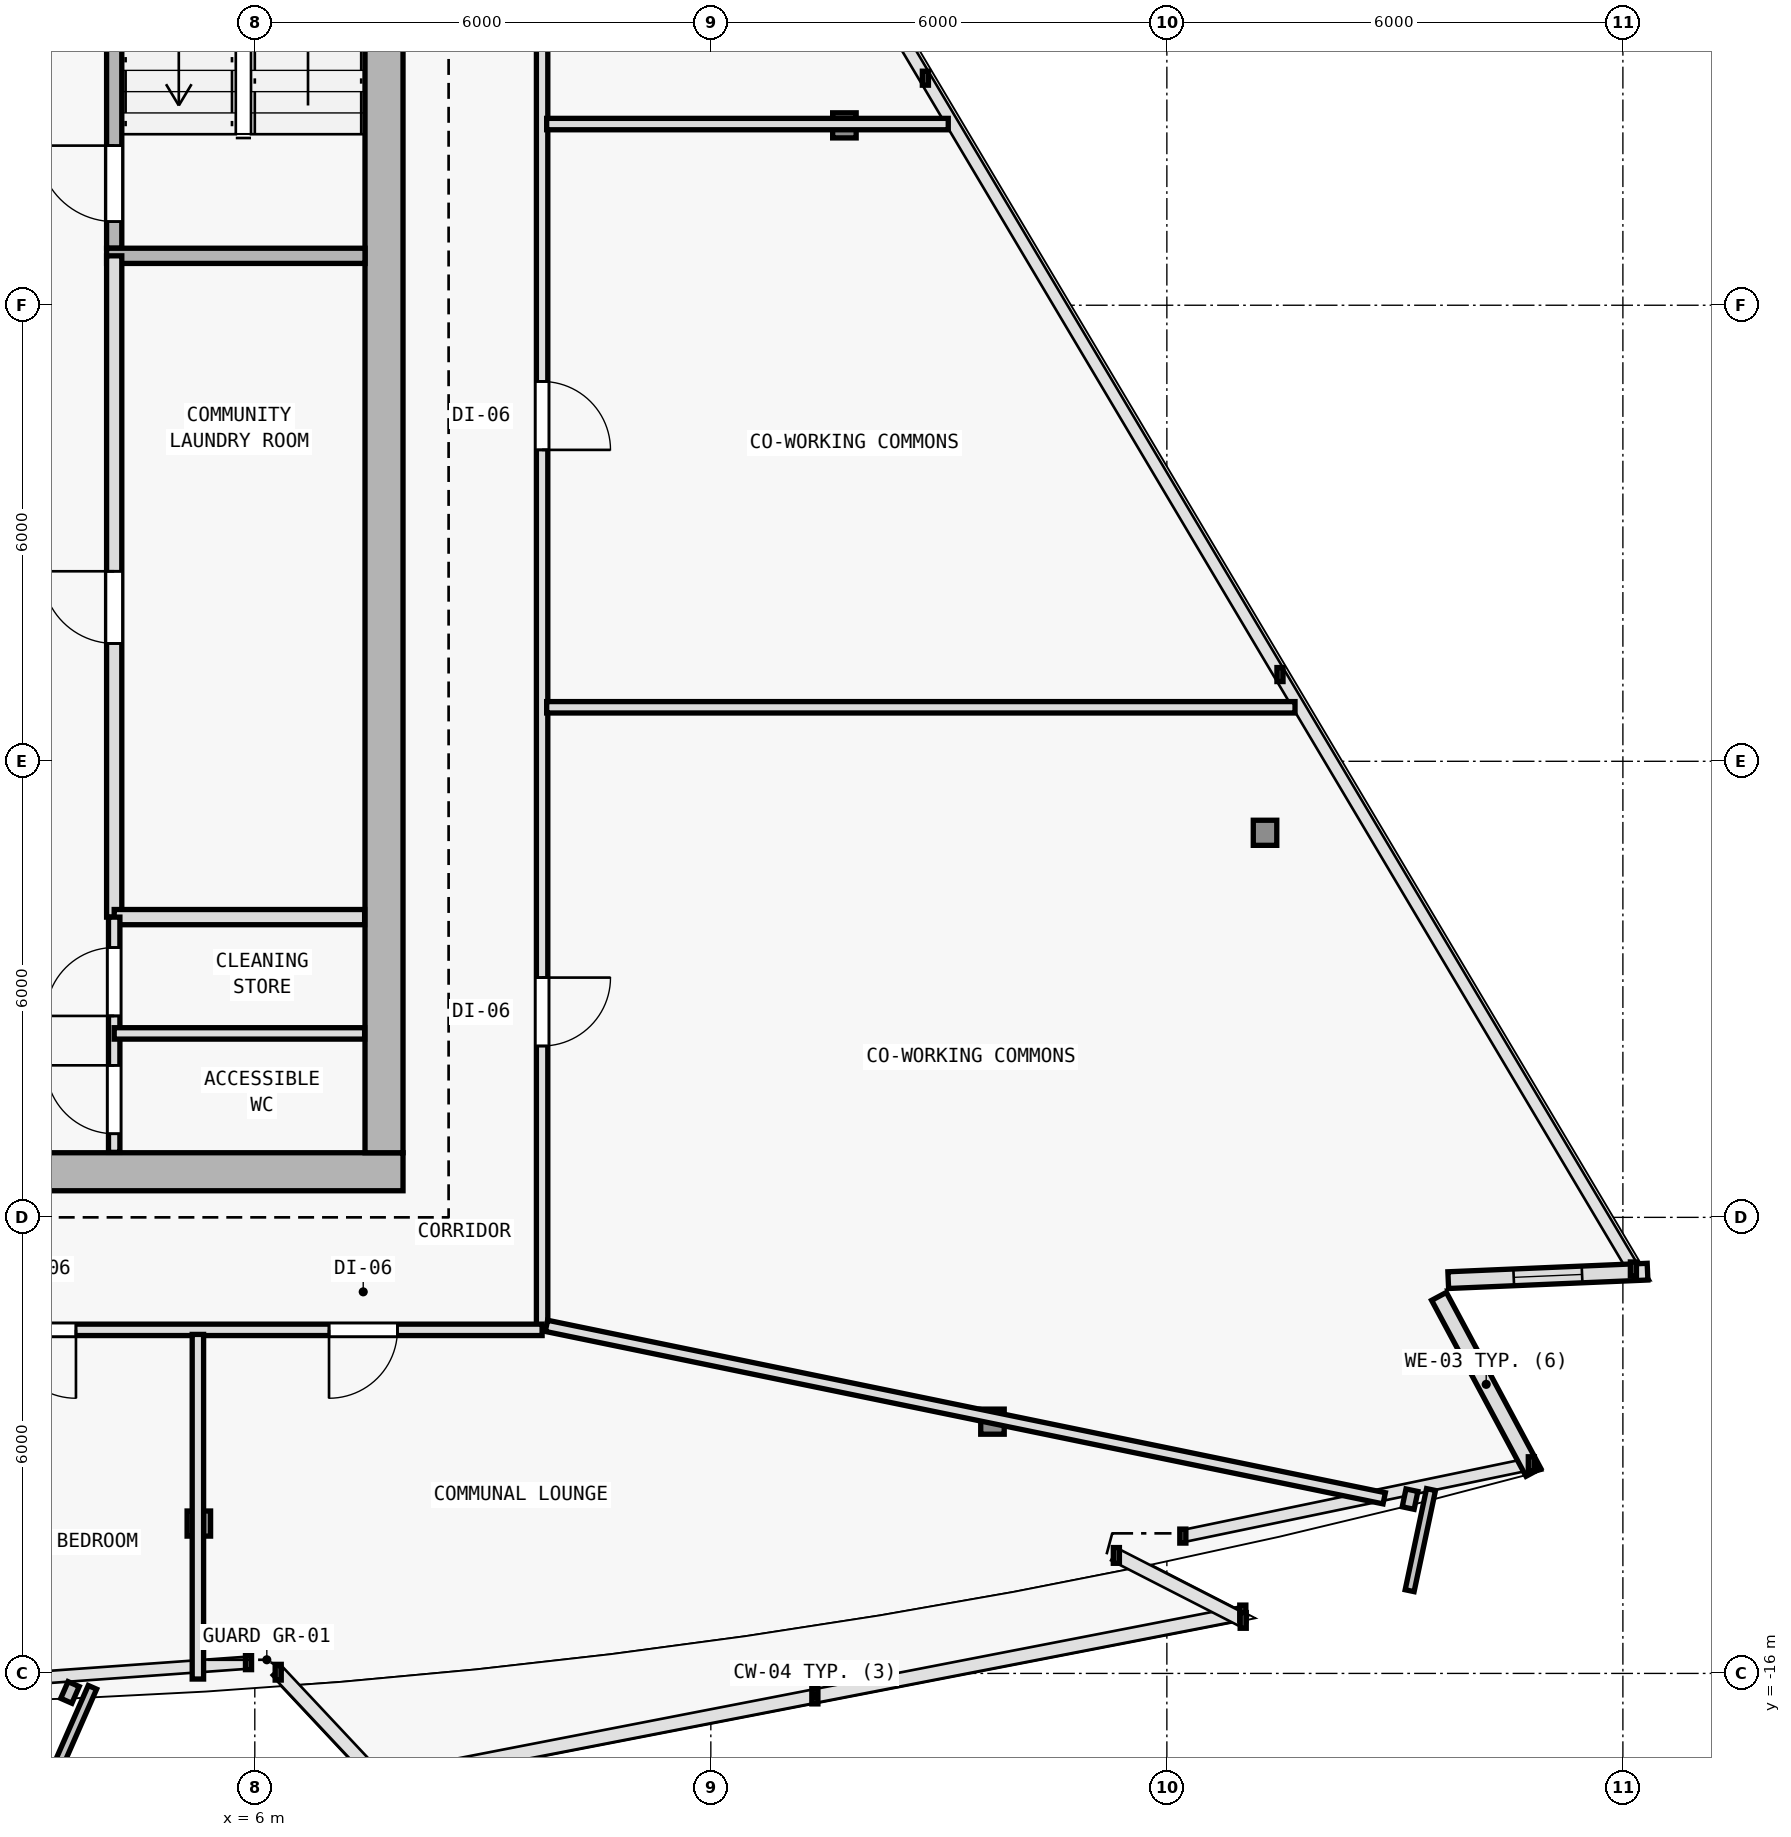
"""IFC4 building model, lengths in metres.
Left out: names, types, materials, properties, quantities, classifications, styles, units other than length and angle.
Written with IfcOpenShell. Run it as: python <this file> out.ifc"""

import sys

from ifc_helpers import new_model, si_unit, direction, frame, frame_2d, origin, origin_2d, place, context, subcontext, project, spatial, rectangle, i_section, extrude, element, fill, save


model = new_model("IFC4")
c1 = context("Model", 3, precision=1e-05, world=origin(), true_north=direction((0.0, 1.0)))
c2 = subcontext(c1, "Body", "Model", "MODEL_VIEW")
j1 = project(units=[si_unit("LENGTHUNIT", "METRE"), si_unit("PLANEANGLEUNIT", "RADIAN")], contexts=[c1])
p1 = place(None, origin())
s1 = spatial("IfcSite", under=j1, at=p1, CompositionType="ELEMENT")
p2 = place(p1, origin())
s2 = spatial("IfcBuilding", under=s1, at=p2, CompositionType="ELEMENT")
p3 = place(p2, frame((0.0, 0.0, 261.6)))
s3 = spatial("IfcBuildingStorey", under=s2, at=p3, CompositionType="ELEMENT", Elevation=261.6)
for number, where, z_axis, x_axis in (
    (1, (7.7, -9.4, 0.0), (0.0, 0.0, 1.0), (1.0, 0.0, 0.0)),
    (2, (7.7, 0.4, 0.0), (0.0, 0.0, 1.0), (1.0, 0.0, 0.0)),
):
    element("IfcColumn", number, at=place(p3, frame(where, z_axis=z_axis, x_axis=x_axis)), inside=s3, PredefinedType="COLUMN", context=c2, shape_type="SweptSolid", body=[
        extrude(i_section(OverallWidth=0.374, OverallDepth=0.372, WebThickness=0.012, FlangeThickness=0.02, FilletRadius=0.015, at=origin_2d()), origin(), (0.0, 0.0, 1.0), 3.6),
    ])
p4 = place(p3, frame((5.264, -14.028, 0.005), z_axis=(-0.006865858153, 0.03521301508, 0.99935624457), x_axis=(-0.981516643497, -0.191376797284, 0.0)))
e3 = element("IfcColumn", 3, at=p4, inside=s3, PredefinedType="COLUMN", context=c2, shape_type="SweptSolid", body=[
    extrude(i_section(OverallWidth=0.309, OverallDepth=0.33, WebThickness=0.011, FlangeThickness=0.019, FilletRadius=0.027, at=origin_2d()), origin(), (0.0, 0.0, 1.0), 3.591),
])
p5 = place(p3, frame((15.706, -12.688, 0.005), z_axis=(-0.020594893987, 0.033509183946, 0.999226193078), x_axis=(-0.851954850327, -0.523615252838, 0.0)))
e4 = element("IfcColumn", 4, at=p5, inside=s3, PredefinedType="COLUMN", context=c2, shape_type="SweptSolid", body=[
    extrude(i_section(OverallWidth=0.309, OverallDepth=0.33, WebThickness=0.011, FlangeThickness=0.019, FilletRadius=0.027, at=origin_2d()), origin(), (0.0, 0.0, 1.0), 3.592),
])
p6 = place(p3, frame((19.292, -4.941, 0.005), z_axis=(-0.026037725696, 0.021618790526, 0.9994271683), x_axis=(-0.638800249892, -0.769372628015, 0.0)))
e5 = element("IfcColumn", 5, at=p6, inside=s3, PredefinedType="COLUMN", context=c2, shape_type="SweptSolid", body=[
    extrude(i_section(OverallWidth=0.309, OverallDepth=0.33, WebThickness=0.011, FlangeThickness=0.019, FilletRadius=0.027, at=origin_2d()), origin(), (0.0, 0.0, 1.0), 3.591),
])
p7 = place(p3, frame((13.757, 4.366, 0.005), z_axis=(-0.018906041, 0.009521027842, 0.999775930718), x_axis=(-0.449781931574, -0.893138406984, 0.0)))
e6 = element("IfcColumn", 6, at=p7, inside=s3, PredefinedType="COLUMN", context=c2, shape_type="SweptSolid", body=[
    extrude(i_section(OverallWidth=0.309, OverallDepth=0.33, WebThickness=0.011, FlangeThickness=0.019, FilletRadius=0.027, at=origin_2d()), origin(), (0.0, 0.0, 1.0), 3.59),
])
p8 = place(p3, frame((21.581, -11.04, 0.0), z_axis=(0.0, 0.0, 1.0), x_axis=(0.472791303324, -0.881174434208, 0.0)))
e7 = element("IfcWall", 7, at=p8, inside=s3, PredefinedType="SOLIDWALL", context=c2, shape_type="SweptSolid", body=[
    extrude(rectangle(XDim=2.627, YDim=0.22, at=frame_2d((1.313, 0.0))), origin(), (0.0, 0.0, 1.0), 3.35),
])
p9 = place(p3, frame((24.324, -10.714, 0.0), z_axis=(0.0, 0.0, 1.0), x_axis=(-0.999095924753, -0.042512740932, 0.0)))
e8 = element("IfcWall", 8, at=p9, inside=s3, PredefinedType="SOLIDWALL", context=c2, shape_type="SweptSolid", body=[
    extrude(rectangle(XDim=2.625, YDim=0.22, at=frame_2d((1.312, 0.0))), origin(), (0.0, 0.0, 1.0), 3.35),
])
p10 = place(p9, frame((0.862, 0.0, 0.62)))
e9 = element("IfcOpeningElement", 9, at=p10, cuts=e8, PredefinedType="OPENING", context=c2, shape_type="SweptSolid", body=[
    extrude(rectangle(XDim=0.9, YDim=1.6, at=frame_2d((0.45, 0.8))), frame((0.0, 0.12, 0.0), z_axis=(0.0, -1.0, 0.0), x_axis=(1.0, 0.0, 0.0)), (0.0, 0.0, 1.0), 0.24),
])
p11 = place(p3, frame((-7.95, -9.4, 0.0), z_axis=(0.0, 0.0, 1.0), x_axis=(1.0, 0.0, 0.0)))
e10 = element("IfcWall", 10, at=p11, inside=s3, PredefinedType="SHEAR", context=c2, shape_type="SweptSolid", body=[
    extrude(rectangle(XDim=15.9, YDim=0.5, at=frame_2d((7.95, 0.0))), origin(), (0.0, 0.0, 1.0), 3.35),
])
p12 = place(p11, frame((9.6, 0.0, 0.0)))
e11 = element("IfcOpeningElement", 11, at=p12, cuts=e10, PredefinedType="OPENING", context=c2, shape_type="SweptSolid", body=[
    extrude(rectangle(XDim=1.5, YDim=2.2, at=frame_2d((0.75, 1.1))), frame((0.0, 0.26, 0.0), z_axis=(0.0, -1.0, 0.0), x_axis=(1.0, 0.0, 0.0)), (0.0, 0.0, 1.0), 0.52),
])
p13 = place(p3, frame((7.7, 9.95, 0.0), z_axis=(0.0, 0.0, 1.0), x_axis=(0.0, -1.0, 0.0)))
e12 = element("IfcWall", 12, at=p13, inside=s3, PredefinedType="SHEAR", context=c2, shape_type="SweptSolid", body=[
    extrude(rectangle(XDim=19.1, YDim=0.5, at=frame_2d((9.55, 0.0))), origin(), (0.0, 0.0, 1.0), 3.35),
])
p14 = place(p3, frame((4.15, 2.75, 0.0), z_axis=(0.0, 0.0, 1.0), x_axis=(0.0, 1.0, 0.0)))
e13 = element("IfcWall", 13, at=p14, inside=s3, PredefinedType="SOLIDWALL", context=c2, shape_type="SweptSolid", body=[
    extrude(rectangle(XDim=7.2, YDim=0.2, at=frame_2d((3.6, 0.0))), origin(), (0.0, 0.0, 1.0), 3.35),
])
p15 = place(p14, frame((0.35, 0.0, 0.0)))
e14 = element("IfcOpeningElement", 14, at=p15, cuts=e13, PredefinedType="OPENING", context=c2, shape_type="SweptSolid", body=[
    extrude(rectangle(XDim=1.0, YDim=2.15, at=frame_2d((0.5, 1.075))), frame((0.0, 0.11, 0.0), z_axis=(0.0, -1.0, 0.0), x_axis=(1.0, 0.0, 0.0)), (0.0, 0.0, 1.0), 0.22),
])
p16 = place(p3, frame((4.05, 2.65, 0.0), z_axis=(0.0, 0.0, 1.0), x_axis=(1.0, 0.0, 0.0)))
e15 = element("IfcWall", 15, at=p16, inside=s3, PredefinedType="SOLIDWALL", context=c2, shape_type="SweptSolid", body=[
    extrude(rectangle(XDim=3.4, YDim=0.2, at=frame_2d((1.7, 0.0))), origin(), (0.0, 0.0, 1.0), 3.35),
])
p17 = place(p3, frame((4.15, -6.05, 0.0), z_axis=(0.0, 0.0, 1.0), x_axis=(0.0, 1.0, 0.0)))
e16 = element("IfcWall", 16, at=p17, inside=s3, PredefinedType="SOLIDWALL", context=c2, shape_type="SweptSolid", body=[
    extrude(rectangle(XDim=8.7, YDim=0.2, at=frame_2d((4.35, 0.0))), origin(), (0.0, 0.0, 1.0), 3.35),
])
p18 = place(p17, frame((3.6, 0.0, 0.0)))
e17 = element("IfcOpeningElement", 17, at=p18, cuts=e16, PredefinedType="OPENING", context=c2, shape_type="SweptSolid", body=[
    extrude(rectangle(XDim=0.95, YDim=2.1, at=frame_2d((0.475, 1.05))), frame((0.0, 0.11, 0.0), z_axis=(0.0, -1.0, 0.0), x_axis=(1.0, 0.0, 0.0)), (0.0, 0.0, 1.0), 0.22),
])
p19 = place(p3, frame((4.15, -6.05, 0.0), z_axis=(0.0, 0.0, 1.0), x_axis=(1.0, 0.0, 0.0)))
e18 = element("IfcWall", 18, at=p19, inside=s3, PredefinedType="SOLIDWALL", context=c2, shape_type="SweptSolid", body=[
    extrude(rectangle(XDim=3.295, YDim=0.2, at=frame_2d((1.647, 0.0))), origin(), (0.0, 0.0, 1.0), 3.35),
])
p20 = place(p3, frame((4.15, -9.145, 0.0), z_axis=(0.0, 0.0, 1.0), x_axis=(0.0, 1.0, 0.0)))
e19 = element("IfcWall", 19, at=p20, inside=s3, PredefinedType="PARTITIONING", context=c2, shape_type="SweptSolid", body=[
    extrude(rectangle(XDim=3.095, YDim=0.15, at=frame_2d((1.547, 0.0))), origin(), (0.0, 0.0, 1.0), 3.35),
])
p21 = place(p20, frame((0.245, 0.0, 0.0)))
e20 = element("IfcOpeningElement", 20, at=p21, cuts=e19, PredefinedType="OPENING", context=c2, shape_type="SweptSolid", body=[
    extrude(rectangle(XDim=0.9, YDim=2.1, at=frame_2d((0.45, 1.05))), frame((0.0, 0.085, 0.0), z_axis=(0.0, -1.0, 0.0), x_axis=(1.0, 0.0, 0.0)), (0.0, 0.0, 1.0), 0.17),
])
p22 = place(p20, frame((1.795, 0.0, 0.0)))
e21 = element("IfcOpeningElement", 21, at=p22, cuts=e19, PredefinedType="OPENING", context=c2, shape_type="SweptSolid", body=[
    extrude(rectangle(XDim=0.9, YDim=2.1, at=frame_2d((0.45, 1.05))), frame((0.0, 0.085, 0.0), z_axis=(0.0, -1.0, 0.0), x_axis=(1.0, 0.0, 0.0)), (0.0, 0.0, 1.0), 0.17),
])
p23 = place(p3, frame((4.15, -7.58, 0.0), z_axis=(0.0, 0.0, 1.0), x_axis=(1.0, 0.0, 0.0)))
e22 = element("IfcWall", 22, at=p23, inside=s3, PredefinedType="PARTITIONING", context=c2, shape_type="SweptSolid", body=[
    extrude(rectangle(XDim=3.295, YDim=0.15, at=frame_2d((1.647, 0.0))), origin(), (0.0, 0.0, 1.0), 3.35),
])
p24 = place(p3, frame((9.78, 8.226, 0.0), z_axis=(0.0, 0.0, 1.0), x_axis=(0.0, -1.0, 0.0)))
e23 = element("IfcWall", 23, at=p24, inside=s3, PredefinedType="PARTITIONING", context=c2, shape_type="SweptSolid", body=[
    extrude(rectangle(XDim=19.706, YDim=0.15, at=frame_2d((9.853, 0.0))), origin(), (0.0, 0.0, 1.0), 2.775),
])
p25 = place(p24, frame((15.072, 0.0, 0.0)))
e24 = element("IfcOpeningElement", 24, at=p25, cuts=e23, PredefinedType="OPENING", context=c2, shape_type="SweptSolid", body=[
    extrude(rectangle(XDim=0.9, YDim=2.1, at=frame_2d((0.45, 1.05))), frame((0.0, 0.085, 0.0), z_axis=(0.0, -1.0, 0.0), x_axis=(1.0, 0.0, 0.0)), (0.0, 0.0, 1.0), 0.17),
])
p26 = place(p24, frame((7.229, 0.0, 0.0)))
e25 = element("IfcOpeningElement", 25, at=p26, cuts=e23, PredefinedType="OPENING", context=c2, shape_type="SweptSolid", body=[
    extrude(rectangle(XDim=0.9, YDim=2.1, at=frame_2d((0.45, 1.05))), frame((0.0, 0.085, 0.0), z_axis=(0.0, -1.0, 0.0), x_axis=(1.0, 0.0, 0.0)), (0.0, 0.0, 1.0), 0.17),
])
p27 = place(p3, frame((9.78, -11.48, 0.0), z_axis=(0.0, 0.0, 1.0), x_axis=(-1.0, 0.0, 0.0)))
e26 = element("IfcWall", 26, at=p27, inside=s3, PredefinedType="PARTITIONING", context=c2, shape_type="SweptSolid", body=[
    extrude(rectangle(XDim=19.56, YDim=0.15, at=frame_2d((9.78, 0.0))), origin(), (0.0, 0.0, 1.0), 2.725),
])
p28 = place(p27, frame((16.757, 0.0, 0.0)))
e27 = element("IfcOpeningElement", 27, at=p28, cuts=e26, PredefinedType="OPENING", context=c2, shape_type="SweptSolid", body=[
    extrude(rectangle(XDim=0.9, YDim=2.1, at=frame_2d((0.45, 1.05))), frame((0.0, 0.085, 0.0), z_axis=(0.0, -1.0, 0.0), x_axis=(1.0, 0.0, 0.0)), (0.0, 0.0, 1.0), 0.17),
])
p29 = place(p27, frame((12.983, 0.0, 0.0)))
e28 = element("IfcOpeningElement", 28, at=p29, cuts=e26, PredefinedType="OPENING", context=c2, shape_type="SweptSolid", body=[
    extrude(rectangle(XDim=0.9, YDim=2.1, at=frame_2d((0.45, 1.05))), frame((0.0, 0.085, 0.0), z_axis=(0.0, -1.0, 0.0), x_axis=(1.0, 0.0, 0.0)), (0.0, 0.0, 1.0), 0.17),
])
p30 = place(p27, frame((9.786, 0.0, 0.0)))
e29 = element("IfcOpeningElement", 29, at=p30, cuts=e26, PredefinedType="OPENING", context=c2, shape_type="SweptSolid", body=[
    extrude(rectangle(XDim=0.9, YDim=2.1, at=frame_2d((0.45, 1.05))), frame((0.0, 0.085, 0.0), z_axis=(0.0, -1.0, 0.0), x_axis=(1.0, 0.0, 0.0)), (0.0, 0.0, 1.0), 0.17),
])
p31 = place(p27, frame((6.133, 0.0, 0.0)))
e30 = element("IfcOpeningElement", 30, at=p31, cuts=e26, PredefinedType="OPENING", context=c2, shape_type="SweptSolid", body=[
    extrude(rectangle(XDim=0.9, YDim=2.1, at=frame_2d((0.45, 1.05))), frame((0.0, 0.085, 0.0), z_axis=(0.0, -1.0, 0.0), x_axis=(1.0, 0.0, 0.0)), (0.0, 0.0, 1.0), 0.17),
])
p32 = place(p27, frame((1.904, 0.0, 0.0)))
e31 = element("IfcOpeningElement", 31, at=p32, cuts=e26, PredefinedType="OPENING", context=c2, shape_type="SweptSolid", body=[
    extrude(rectangle(XDim=0.9, YDim=2.1, at=frame_2d((0.45, 1.05))), frame((0.0, 0.085, 0.0), z_axis=(0.0, -1.0, 0.0), x_axis=(1.0, 0.0, 0.0)), (0.0, 0.0, 1.0), 0.17),
])
p33 = place(p3, frame((5.251, -11.54, 0.0), z_axis=(0.0, 0.0, 1.0), x_axis=(0.0, -1.0, 0.0)))
e32 = element("IfcWall", 32, at=p33, inside=s3, PredefinedType="PARTITIONING", context=c2, shape_type="SweptSolid", body=[
    extrude(rectangle(XDim=4.534, YDim=0.15, at=frame_2d((2.267, 0.0))), origin(), (0.0, 0.0, 1.0), 2.775),
])
p34 = place(p3, frame((9.837, -11.427, 0.0), z_axis=(0.0, 0.0, 1.0), x_axis=(0.979466368173, -0.201607622916, 0.0)))
e33 = element("IfcWall", 33, at=p34, inside=s3, PredefinedType="PARTITIONING", context=c2, shape_type="SweptSolid", body=[
    extrude(rectangle(XDim=11.253, YDim=0.15, at=frame_2d((5.627, 0.0))), origin(), (0.0, 0.0, 1.0), 2.775),
])
p35 = place(p3, frame((9.84, 4.384, 0.0), z_axis=(0.0, 0.0, 1.0), x_axis=(1.0, 0.0, 0.0)))
e34 = element("IfcWall", 34, at=p35, inside=s3, PredefinedType="PARTITIONING", context=c2, shape_type="SweptSolid", body=[
    extrude(rectangle(XDim=5.284, YDim=0.15, at=frame_2d((2.642, 0.0))), origin(), (0.0, 0.0, 1.0), 2.925),
])
p36 = place(p3, frame((9.84, -3.29, 0.0), z_axis=(0.0, 0.0, 1.0), x_axis=(1.0, 0.0, 0.0)))
e35 = element("IfcWall", 35, at=p36, inside=s3, PredefinedType="PARTITIONING", context=c2, shape_type="SweptSolid", body=[
    extrude(rectangle(XDim=9.846, YDim=0.15, at=frame_2d((4.923, 0.0))), origin(), (0.0, 0.0, 1.0), 2.875),
])
p37 = place(p10, origin())
e36 = element("IfcWindow", 36, at=p37, inside=s3, PartitioningType="SINGLE_PANEL", PredefinedType="WINDOW", context=c2, shape_type="SweptSolid", body=[
    extrude(rectangle(XDim=0.9, YDim=1.6, at=frame_2d((0.45, 0.8))), frame((0.0, 0.03, 0.0), z_axis=(0.0, -1.0, 0.0), x_axis=(1.0, 0.0, 0.0)), (0.0, 0.0, 1.0), 0.06),
])
fill(e9, e36)
p38 = place(p15, origin())
e37 = element("IfcDoor", 37, at=p38, inside=s3, OperationType="SINGLE_SWING_RIGHT", PredefinedType="DOOR", context=c2, shape_type="SweptSolid", body=[
    extrude(rectangle(XDim=1.0, YDim=2.15, at=frame_2d((0.5, 1.075))), frame((0.0, 0.025, 0.0), z_axis=(0.0, -1.0, 0.0), x_axis=(1.0, 0.0, 0.0)), (0.0, 0.0, 1.0), 0.05),
])
fill(e14, e37)
p39 = place(p18, origin())
e38 = element("IfcDoor", 38, at=p39, inside=s3, OperationType="SINGLE_SWING_RIGHT", PredefinedType="DOOR", context=c2, shape_type="SweptSolid", body=[
    extrude(rectangle(XDim=0.95, YDim=2.1, at=frame_2d((0.475, 1.05))), frame((0.0, 0.025, 0.0), z_axis=(0.0, -1.0, 0.0), x_axis=(1.0, 0.0, 0.0)), (0.0, 0.0, 1.0), 0.05),
])
fill(e17, e38)
p40 = place(p21, origin())
e39 = element("IfcDoor", 39, at=p40, inside=s3, OperationType="SINGLE_SWING_RIGHT", PredefinedType="DOOR", context=c2, shape_type="SweptSolid", body=[
    extrude(rectangle(XDim=0.9, YDim=2.1, at=frame_2d((0.45, 1.05))), frame((0.0, 0.025, 0.0), z_axis=(0.0, -1.0, 0.0), x_axis=(1.0, 0.0, 0.0)), (0.0, 0.0, 1.0), 0.05),
])
fill(e20, e39)
p41 = place(p22, origin())
e40 = element("IfcDoor", 40, at=p41, inside=s3, OperationType="SINGLE_SWING_LEFT", PredefinedType="DOOR", context=c2, shape_type="SweptSolid", body=[
    extrude(rectangle(XDim=0.9, YDim=2.1, at=frame_2d((0.45, 1.05))), frame((0.0, 0.025, 0.0), z_axis=(0.0, -1.0, 0.0), x_axis=(1.0, 0.0, 0.0)), (0.0, 0.0, 1.0), 0.05),
])
fill(e21, e40)
p42 = place(p31, origin())
e41 = element("IfcDoor", 41, at=p42, inside=s3, OperationType="SINGLE_SWING_LEFT", PredefinedType="DOOR", context=c2, shape_type="SweptSolid", body=[
    extrude(rectangle(XDim=0.9, YDim=2.1, at=frame_2d((0.45, 1.05))), frame((0.0, 0.025, 0.0), z_axis=(0.0, -1.0, 0.0), x_axis=(1.0, 0.0, 0.0)), (0.0, 0.0, 1.0), 0.05),
])
fill(e30, e41)
p43 = place(p32, origin())
e42 = element("IfcDoor", 42, at=p43, inside=s3, OperationType="SINGLE_SWING_RIGHT", PredefinedType="DOOR", context=c2, shape_type="SweptSolid", body=[
    extrude(rectangle(XDim=0.9, YDim=2.1, at=frame_2d((0.45, 1.05))), frame((0.0, 0.025, 0.0), z_axis=(0.0, -1.0, 0.0), x_axis=(1.0, 0.0, 0.0)), (0.0, 0.0, 1.0), 0.05),
])
fill(e31, e42)
p44 = place(p25, origin())
e43 = element("IfcDoor", 43, at=p44, inside=s3, OperationType="SINGLE_SWING_LEFT", PredefinedType="DOOR", context=c2, shape_type="SweptSolid", body=[
    extrude(rectangle(XDim=0.9, YDim=2.1, at=frame_2d((0.45, 1.05))), frame((0.0, 0.025, 0.0), z_axis=(0.0, -1.0, 0.0), x_axis=(1.0, 0.0, 0.0)), (0.0, 0.0, 1.0), 0.05),
])
fill(e24, e43)
p45 = place(p26, origin())
e44 = element("IfcDoor", 44, at=p45, inside=s3, OperationType="SINGLE_SWING_RIGHT", PredefinedType="DOOR", context=c2, shape_type="SweptSolid", body=[
    extrude(rectangle(XDim=0.9, YDim=2.1, at=frame_2d((0.45, 1.05))), frame((0.0, 0.025, 0.0), z_axis=(0.0, -1.0, 0.0), x_axis=(1.0, 0.0, 0.0)), (0.0, 0.0, 1.0), 0.05),
])
fill(e25, e44)
save(model, sys.argv[1])
